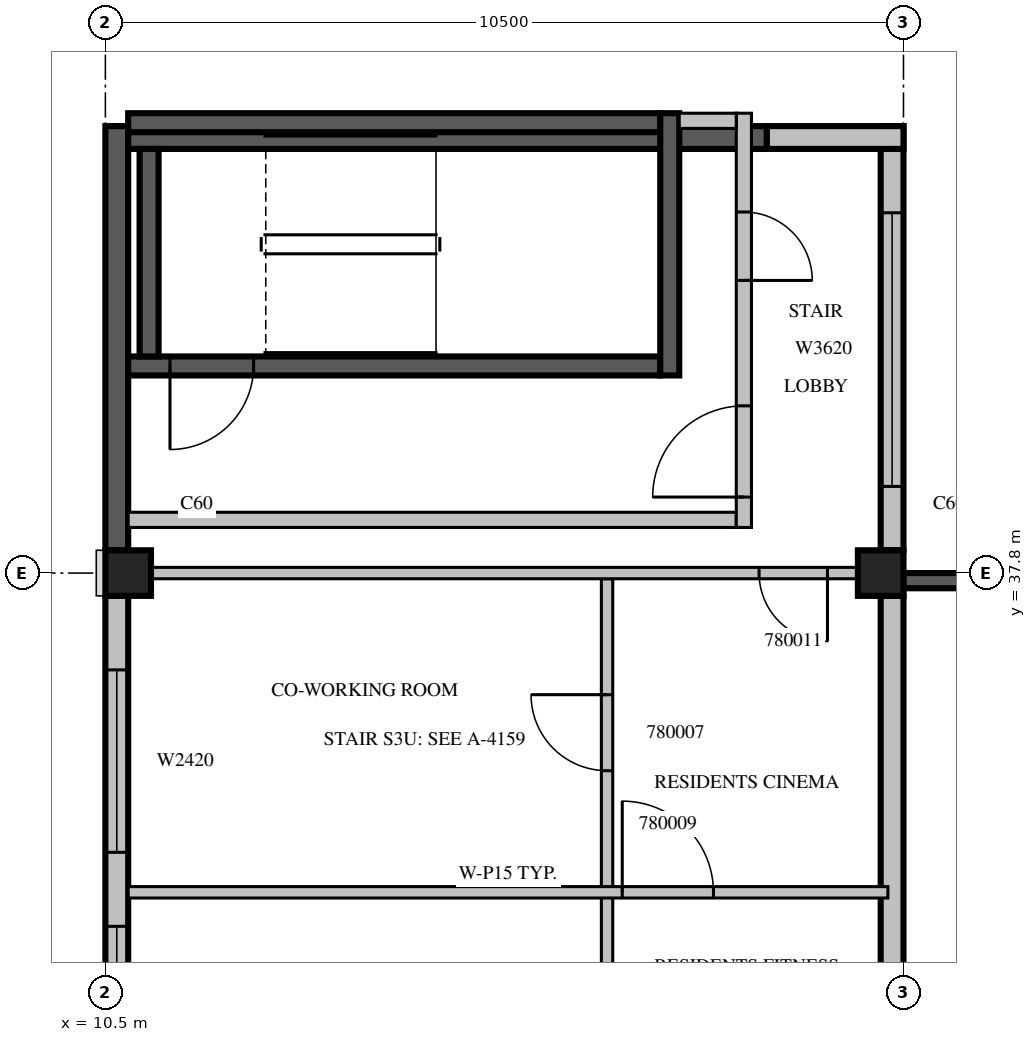
"""IFC4 building model, lengths in metres.
Left out: names, types, materials, properties, quantities, classifications, styles, units other than length and angle.
Written with IfcOpenShell. Run it as: python <this file> out.ifc"""

import sys

from ifc_helpers import new_model, si_unit, direction, frame, frame_2d, origin, origin_2d, place, context, subcontext, project, spatial, rectangle, extrude, source, transform, mapped, element, fill, save


model = new_model("IFC4")
c1 = context("Model", 3, precision=1e-05, world=origin(), true_north=direction((0.0, 1.0)))
c2 = subcontext(c1, "Body", "Model", "MODEL_VIEW")
j1 = project(units=[si_unit("LENGTHUNIT", "METRE"), si_unit("PLANEANGLEUNIT", "RADIAN")], contexts=[c1])
p1 = place(None, origin())
s1 = spatial("IfcSite", under=j1, at=p1, CompositionType="ELEMENT")
p2 = place(p1, origin())
s2 = spatial("IfcBuilding", under=s1, at=p2, CompositionType="ELEMENT")
p3 = place(p2, frame((0.0, 0.0, 340.5)))
s3 = spatial("IfcBuildingStorey", under=s2, at=p3, CompositionType="ELEMENT", Elevation=340.5)
m1 = source(origin(), c2, "Body", "SweptSolid", [
    extrude(rectangle(XDim=0.6, YDim=0.6, at=origin_2d()), origin(), (0.0, 0.0, 1.0), 3.5),
])
for number, where, z_axis, x_axis in (
    (1, (10.8, 37.8, 0.0), (0.0, 0.0, 1.0), (1.0, 0.0, 0.0)),
    (2, (20.7, 37.8, 0.0), (0.0, 0.0, 1.0), (1.0, 0.0, 0.0)),
):
    element("IfcColumn", number, at=place(p3, frame(where, z_axis=z_axis, x_axis=x_axis)), inside=s3, PredefinedType="COLUMN", context=c2, shape_type="MappedRepresentation", body=[
        mapped(m1, transform((0.0, 0.0, 0.0), scale=1.0)),
    ])
m2 = source(origin(), c2, "Body", "SweptSolid", [
    extrude(rectangle(XDim=7.8, YDim=0.3, at=frame_2d((3.9, 0.0))), origin(), (0.0, 0.0, 1.0), 3.1),
])
p4 = place(p3, frame((20.85, 29.7, 0.0), z_axis=(0.0, 0.0, 1.0), x_axis=(0.0, 1.0, 0.0)))
e3 = element("IfcWall", 3, at=p4, inside=s3, PredefinedType="STANDARD", context=c2, shape_type="MappedRepresentation", body=[
    mapped(m2, transform((0.0, 0.0, 0.0), scale=1.0)),
])
m3 = source(origin(), c2, "Body", "SweptSolid", [
    extrude(rectangle(XDim=1.0, YDim=2.1, at=frame_2d((0.5, 1.05))), frame((0.0, 0.16, 0.0), z_axis=(0.0, -1.0, 0.0), x_axis=(1.0, 0.0, 0.0)), (0.0, 0.0, 1.0), 0.32),
])
p5 = place(p4, frame((1.767, 0.0, 0.0)))
e4 = element("IfcOpeningElement", 4, at=p5, cuts=e3, PredefinedType="OPENING", context=c2, shape_type="MappedRepresentation", body=[
    mapped(m3, transform((0.0, 0.0, 0.0), scale=1.0)),
])
m4 = source(origin(), c2, "Body", "SweptSolid", [
    extrude(rectangle(XDim=5.58, YDim=0.3, at=frame_2d((2.79, 0.0))), origin(), (0.0, 0.0, 1.0), 3.1),
])
p6 = place(p3, frame((20.85, 38.1, 0.0), z_axis=(0.0, 0.0, 1.0), x_axis=(0.0, 1.0, 0.0)))
e5 = element("IfcWall", 5, at=p6, inside=s3, PredefinedType="STANDARD", context=c2, shape_type="MappedRepresentation", body=[
    mapped(m4, transform((0.0, 0.0, 0.0), scale=1.0)),
])
m5 = source(origin(), c2, "Body", "SweptSolid", [
    extrude(rectangle(XDim=3.6, YDim=2.0, at=frame_2d((1.8, 1.0))), frame((0.0, 0.16, 0.0), z_axis=(0.0, -1.0, 0.0), x_axis=(1.0, 0.0, 0.0)), (0.0, 0.0, 1.0), 0.32),
])
p7 = place(p6, frame((0.84, 0.0, 0.6)))
e6 = element("IfcOpeningElement", 6, at=p7, cuts=e5, PredefinedType="OPENING", context=c2, shape_type="MappedRepresentation", body=[
    mapped(m5, transform((0.0, 0.0, 0.0), scale=1.0)),
])
m6 = source(origin(), c2, "Body", "SweptSolid", [
    extrude(rectangle(XDim=1.8, YDim=0.3, at=frame_2d((0.9, 0.0))), origin(), (0.0, 0.0, 1.0), 3.1),
])
p8 = place(p3, frame((21.0, 43.53, 0.0), z_axis=(0.0, 0.0, 1.0), x_axis=(-1.0, 0.0, 0.0)))
e7 = element("IfcWall", 7, at=p8, inside=s3, PredefinedType="STANDARD", context=c2, shape_type="MappedRepresentation", body=[
    mapped(m6, transform((0.0, 0.0, 0.0), scale=1.0)),
])
m7 = source(origin(), c2, "Body", "SweptSolid", [
    extrude(rectangle(XDim=8.6, YDim=0.3, at=frame_2d((4.3, 0.0))), origin(), (0.0, 0.0, 1.0), 3.1),
])
p9 = place(p3, frame((19.2, 43.53, 0.0), z_axis=(0.0, 0.0, 1.0), x_axis=(-1.0, 0.0, 0.0)))
e8 = element("IfcWall", 8, at=p9, inside=s3, PredefinedType="SOLIDWALL", context=c2, shape_type="MappedRepresentation", body=[
    mapped(m7, transform((0.0, 0.0, 0.0), scale=1.0)),
])
m8 = source(origin(), c2, "Body", "SweptSolid", [
    extrude(rectangle(XDim=5.58, YDim=0.3, at=frame_2d((2.79, 0.0))), origin(), (0.0, 0.0, 1.0), 3.1),
])
p10 = place(p3, frame((10.65, 43.68, 0.0), z_axis=(0.0, 0.0, 1.0), x_axis=(0.0, -1.0, 0.0)))
e9 = element("IfcWall", 9, at=p10, inside=s3, PredefinedType="SOLIDWALL", context=c2, shape_type="MappedRepresentation", body=[
    mapped(m8, transform((0.0, 0.0, 0.0), scale=1.0)),
])
p11 = place(p3, frame((10.65, 37.5, 0.0), z_axis=(0.0, 0.0, 1.0), x_axis=(0.0, -1.0, 0.0)))
e10 = element("IfcWall", 10, at=p11, inside=s3, PredefinedType="STANDARD", context=c2, shape_type="SweptSolid", body=[
    extrude(rectangle(XDim=6.42, YDim=0.3, at=frame_2d((3.21, 0.0))), origin(), (0.0, 0.0, 1.0), 3.1),
])
m9 = source(origin(), c2, "Body", "SweptSolid", [
    extrude(rectangle(XDim=1.2, YDim=2.0, at=frame_2d((0.6, 1.0))), frame((0.0, 0.16, 0.0), z_axis=(0.0, -1.0, 0.0), x_axis=(1.0, 0.0, 0.0)), (0.0, 0.0, 1.0), 0.32),
])
p12 = place(p11, frame((4.348, 0.0, 0.6)))
e11 = element("IfcOpeningElement", 11, at=p12, cuts=e10, PredefinedType="OPENING", context=c2, shape_type="MappedRepresentation", body=[
    mapped(m9, transform((0.0, 0.0, 0.0), scale=1.0)),
])
m10 = source(origin(), c2, "Body", "SweptSolid", [
    extrude(rectangle(XDim=2.4, YDim=2.0, at=frame_2d((1.2, 1.0))), frame((0.0, 0.16, 0.0), z_axis=(0.0, -1.0, 0.0), x_axis=(1.0, 0.0, 0.0)), (0.0, 0.0, 1.0), 0.32),
])
p13 = place(p11, frame((0.974, 0.0, 0.6)))
e12 = element("IfcOpeningElement", 12, at=p13, cuts=e10, PredefinedType="OPENING", context=c2, shape_type="MappedRepresentation", body=[
    mapped(m10, transform((0.0, 0.0, 0.0), scale=1.0)),
])
m11 = source(origin(), c2, "Body", "SweptSolid", [
    extrude(rectangle(XDim=3.9, YDim=0.2, at=frame_2d((1.95, 0.0))), origin(), (0.0, 0.0, 1.0), 3.09),
])
p14 = place(p3, frame((21.0, 37.7, 0.0), z_axis=(0.0, 0.0, 1.0), x_axis=(1.0, 0.0, 0.0)))
e13 = element("IfcWall", 13, at=p14, inside=s3, PredefinedType="SOLIDWALL", context=c2, shape_type="MappedRepresentation", body=[
    mapped(m11, transform((0.0, 0.0, 0.0), scale=1.0)),
])
m12 = source(origin(), c2, "Body", "SweptSolid", [
    extrude(rectangle(XDim=2.4, YDim=2.0, at=frame_2d((1.2, 1.0))), frame((0.0, 0.11, 0.0), z_axis=(0.0, -1.0, 0.0), x_axis=(1.0, 0.0, 0.0)), (0.0, 0.0, 1.0), 0.22),
])
p15 = place(p14, frame((0.75, 0.0, 0.6)))
e14 = element("IfcOpeningElement", 14, at=p15, cuts=e13, PredefinedType="OPENING", context=c2, shape_type="MappedRepresentation", body=[
    mapped(m12, transform((0.0, 0.0, 0.0), scale=1.0)),
])
m13 = source(origin(), c2, "Body", "SweptSolid", [
    extrude(rectangle(XDim=7.0, YDim=0.25, at=frame_2d((3.5, 0.0))), origin(), (0.0, 0.0, 1.0), 3.1),
])
p16 = place(p3, frame((10.8, 40.525, 0.0), z_axis=(0.0, 0.0, 1.0), x_axis=(1.0, 0.0, 0.0)))
e15 = element("IfcWall", 15, at=p16, inside=s3, PredefinedType="SOLIDWALL", context=c2, shape_type="MappedRepresentation", body=[
    mapped(m13, transform((0.0, 0.0, 0.0), scale=1.0)),
])
m14 = source(origin(), c2, "Body", "SweptSolid", [
    extrude(rectangle(XDim=1.1, YDim=2.1, at=frame_2d((0.55, 1.05))), frame((0.0, 0.135, 0.0), z_axis=(0.0, -1.0, 0.0), x_axis=(1.0, 0.0, 0.0)), (0.0, 0.0, 1.0), 0.27),
])
p17 = place(p16, frame((0.55, 0.0, 0.0)))
e16 = element("IfcOpeningElement", 16, at=p17, cuts=e15, PredefinedType="OPENING", context=c2, shape_type="MappedRepresentation", body=[
    mapped(m14, transform((0.0, 0.0, 0.0), scale=1.0)),
])
p18 = place(p3, frame((10.8, 43.725, 0.0), z_axis=(0.0, 0.0, 1.0), x_axis=(1.0, 0.0, 0.0)))
e17 = element("IfcWall", 17, at=p18, inside=s3, PredefinedType="SOLIDWALL", context=c2, shape_type="MappedRepresentation", body=[
    mapped(m13, transform((0.0, 0.0, 0.0), scale=1.0)),
])
m15 = source(origin(), c2, "Body", "SweptSolid", [
    extrude(rectangle(XDim=3.45, YDim=0.25, at=frame_2d((1.725, 0.0))), origin(), (0.0, 0.0, 1.0), 3.1),
])
p19 = place(p3, frame((17.925, 40.4, 0.0), z_axis=(0.0, 0.0, 1.0), x_axis=(0.0, 1.0, 0.0)))
e18 = element("IfcWall", 18, at=p19, inside=s3, PredefinedType="SOLIDWALL", context=c2, shape_type="MappedRepresentation", body=[
    mapped(m15, transform((0.0, 0.0, 0.0), scale=1.0)),
])
m16 = source(origin(), c2, "Body", "SweptSolid", [
    extrude(rectangle(XDim=2.73, YDim=0.25, at=frame_2d((1.365, 0.0))), origin(), (0.0, 0.0, 1.0), 3.1),
])
p20 = place(p3, frame((11.075, 40.65, 0.0), z_axis=(0.0, 0.0, 1.0), x_axis=(0.0, 1.0, 0.0)))
e19 = element("IfcWall", 19, at=p20, inside=s3, PredefinedType="SOLIDWALL", context=c2, shape_type="MappedRepresentation", body=[
    mapped(m16, transform((0.0, 0.0, 0.0), scale=1.0)),
])
m17 = source(origin(), c2, "Body", "SweptSolid", [
    extrude(rectangle(XDim=8.0, YDim=0.2, at=frame_2d((4.0, 0.0))), origin(), (0.0, 0.0, 1.0), 3.1),
])
p21 = place(p3, frame((10.8, 38.5, 0.0), z_axis=(0.0, 0.0, 1.0), x_axis=(1.0, 0.0, 0.0)))
e20 = element("IfcWall", 20, at=p21, inside=s3, PredefinedType="PARTITIONING", context=c2, shape_type="MappedRepresentation", body=[
    mapped(m17, transform((0.0, 0.0, 0.0), scale=1.0)),
])
m18 = source(origin(), c2, "Body", "SweptSolid", [
    extrude(rectangle(XDim=5.45, YDim=0.2, at=frame_2d((2.725, 0.0))), origin(), (0.0, 0.0, 1.0), 3.1),
])
p22 = place(p3, frame((18.9, 38.4, 0.0), z_axis=(0.0, 0.0, 1.0), x_axis=(0.0, 1.0, 0.0)))
e21 = element("IfcWall", 21, at=p22, inside=s3, PredefinedType="PARTITIONING", context=c2, shape_type="MappedRepresentation", body=[
    mapped(m18, transform((0.0, 0.0, 0.0), scale=1.0)),
])
m19 = source(origin(), c2, "Body", "SweptSolid", [
    extrude(rectangle(XDim=1.2, YDim=2.1, at=frame_2d((0.6, 1.05))), frame((0.0, 0.11, 0.0), z_axis=(0.0, -1.0, 0.0), x_axis=(1.0, 0.0, 0.0)), (0.0, 0.0, 1.0), 0.22),
])
p23 = place(p22, frame((0.4, 0.0, 0.0)))
e22 = element("IfcOpeningElement", 22, at=p23, cuts=e21, PredefinedType="OPENING", context=c2, shape_type="MappedRepresentation", body=[
    mapped(m19, transform((0.0, 0.0, 0.0), scale=1.0)),
])
m20 = source(origin(), c2, "Body", "SweptSolid", [
    extrude(rectangle(XDim=0.9, YDim=2.1, at=frame_2d((0.45, 1.05))), frame((0.0, 0.11, 0.0), z_axis=(0.0, -1.0, 0.0), x_axis=(1.0, 0.0, 0.0)), (0.0, 0.0, 1.0), 0.22),
])
p24 = place(p22, frame((3.25, 0.0, 0.0)))
e23 = element("IfcOpeningElement", 23, at=p24, cuts=e21, PredefinedType="OPENING", context=c2, shape_type="MappedRepresentation", body=[
    mapped(m20, transform((0.0, 0.0, 0.0), scale=1.0)),
])
m21 = source(origin(), c2, "Body", "SweptSolid", [
    extrude(rectangle(XDim=0.75, YDim=0.2, at=frame_2d((0.375, 0.0))), origin(), (0.0, 0.0, 1.0), 3.1),
])
p25 = place(p3, frame((18.05, 43.75, 0.0), z_axis=(0.0, 0.0, 1.0), x_axis=(1.0, 0.0, 0.0)))
e24 = element("IfcWall", 24, at=p25, inside=s3, PredefinedType="PARTITIONING", context=c2, shape_type="MappedRepresentation", body=[
    mapped(m21, transform((0.0, 0.0, 0.0), scale=1.0)),
])
m22 = source(origin(), c2, "Body", "SweptSolid", [
    extrude(rectangle(XDim=4.2, YDim=0.15, at=frame_2d((2.1, 0.0))), origin(), (0.0, 0.0, 1.0), 3.1),
])
p26 = place(p3, frame((17.1, 33.6, 0.0), z_axis=(0.0, 0.0, 1.0), x_axis=(0.0, -1.0, 0.0)))
e25 = element("IfcWall", 25, at=p26, inside=s3, PredefinedType="PARTITIONING", context=c2, shape_type="MappedRepresentation", body=[
    mapped(m22, transform((0.0, 0.0, 0.0), scale=1.0)),
])
m23 = source(origin(), c2, "Body", "SweptSolid", [
    extrude(rectangle(XDim=1.0, YDim=2.1, at=frame_2d((0.5, 1.05))), frame((0.0, 0.085, 0.0), z_axis=(0.0, -1.0, 0.0), x_axis=(1.0, 0.0, 0.0)), (0.0, 0.0, 1.0), 0.17),
])
p27 = place(p26, frame((1.6, 0.0, 0.0)))
e26 = element("IfcOpeningElement", 26, at=p27, cuts=e25, PredefinedType="OPENING", context=c2, shape_type="MappedRepresentation", body=[
    mapped(m23, transform((0.0, 0.0, 0.0), scale=1.0)),
])
m24 = source(origin(), c2, "Body", "SweptSolid", [
    extrude(rectangle(XDim=4.105, YDim=0.15, at=frame_2d((2.053, 0.0))), origin(), (0.0, 0.0, 1.0), 3.1),
])
p28 = place(p3, frame((17.1, 37.725, 0.0), z_axis=(0.0, 0.0, 1.0), x_axis=(0.0, -1.0, 0.0)))
e27 = element("IfcWall", 27, at=p28, inside=s3, PredefinedType="PARTITIONING", context=c2, shape_type="MappedRepresentation", body=[
    mapped(m24, transform((0.0, 0.0, 0.0), scale=1.0)),
])
p29 = place(p28, frame((1.525, 0.0, 0.0)))
e28 = element("IfcOpeningElement", 28, at=p29, cuts=e27, PredefinedType="OPENING", context=c2, shape_type="MappedRepresentation", body=[
    mapped(m23, transform((0.0, 0.0, 0.0), scale=1.0)),
])
m25 = source(origin(), c2, "Body", "SweptSolid", [
    extrude(rectangle(XDim=9.995, YDim=0.15, at=frame_2d((4.997, 0.0))), origin(), (0.0, 0.0, 1.0), 3.1),
])
p30 = place(p3, frame((10.8, 33.6, 0.0), z_axis=(0.0, 0.0, 1.0), x_axis=(1.0, 0.0, 0.0)))
e29 = element("IfcWall", 29, at=p30, inside=s3, PredefinedType="PARTITIONING", context=c2, shape_type="MappedRepresentation", body=[
    mapped(m25, transform((0.0, 0.0, 0.0), scale=1.0)),
])
m26 = source(origin(), c2, "Body", "SweptSolid", [
    extrude(rectangle(XDim=1.2, YDim=2.1, at=frame_2d((0.6, 1.05))), frame((0.0, 0.085, 0.0), z_axis=(0.0, -1.0, 0.0), x_axis=(1.0, 0.0, 0.0)), (0.0, 0.0, 1.0), 0.17),
])
p31 = place(p30, frame((6.5, 0.0, 0.0)))
e30 = element("IfcOpeningElement", 30, at=p31, cuts=e29, PredefinedType="OPENING", context=c2, shape_type="MappedRepresentation", body=[
    mapped(m26, transform((0.0, 0.0, 0.0), scale=1.0)),
])
m27 = source(origin(), c2, "Body", "SweptSolid", [
    extrude(rectangle(XDim=9.302, YDim=0.15, at=frame_2d((4.651, 0.0))), origin(), (0.0, 0.0, 1.0), 3.1),
])
p32 = place(p3, frame((20.401, 37.8, 0.0), z_axis=(0.0, 0.0, 1.0), x_axis=(-1.0, 0.0, 0.0)))
e31 = element("IfcWall", 31, at=p32, inside=s3, PredefinedType="PARTITIONING", context=c2, shape_type="MappedRepresentation", body=[
    mapped(m27, transform((0.0, 0.0, 0.0), scale=1.0)),
])
m28 = source(origin(), c2, "Body", "SweptSolid", [
    extrude(rectangle(XDim=0.9, YDim=2.1, at=frame_2d((0.45, 1.05))), frame((0.0, 0.085, 0.0), z_axis=(0.0, -1.0, 0.0), x_axis=(1.0, 0.0, 0.0)), (0.0, 0.0, 1.0), 0.17),
])
p33 = place(p32, frame((0.401, 0.0, 0.0)))
e32 = element("IfcOpeningElement", 32, at=p33, cuts=e31, PredefinedType="OPENING", context=c2, shape_type="MappedRepresentation", body=[
    mapped(m28, transform((0.0, 0.0, 0.0), scale=1.0)),
])
m29 = source(origin(), c2, "Body", "SweptSolid", [
    extrude(rectangle(XDim=3.6, YDim=2.0, at=frame_2d((1.8, 1.0))), frame((0.0, 0.03, 0.0), z_axis=(0.0, -1.0, 0.0), x_axis=(1.0, 0.0, 0.0)), (0.0, 0.0, 1.0), 0.06),
])
p34 = place(p7, origin())
e33 = element("IfcWindow", 33, at=p34, inside=s3, PartitioningType="SINGLE_PANEL", PredefinedType="WINDOW", context=c2, shape_type="MappedRepresentation", body=[
    mapped(m29, transform((0.0, 0.0, 0.0), scale=1.0)),
])
fill(e6, e33)
m30 = source(origin(), c2, "Body", "SweptSolid", [
    extrude(rectangle(XDim=1.2, YDim=2.0, at=frame_2d((0.6, 1.0))), frame((0.0, 0.03, 0.0), z_axis=(0.0, -1.0, 0.0), x_axis=(1.0, 0.0, 0.0)), (0.0, 0.0, 1.0), 0.06),
])
p35 = place(p12, origin())
e34 = element("IfcWindow", 34, at=p35, inside=s3, PartitioningType="SINGLE_PANEL", PredefinedType="WINDOW", context=c2, shape_type="MappedRepresentation", body=[
    mapped(m30, transform((0.0, 0.0, 0.0), scale=1.0)),
])
fill(e11, e34)
m31 = source(origin(), c2, "Body", "SweptSolid", [
    extrude(rectangle(XDim=2.4, YDim=2.0, at=frame_2d((1.2, 1.0))), frame((0.0, 0.03, 0.0), z_axis=(0.0, -1.0, 0.0), x_axis=(1.0, 0.0, 0.0)), (0.0, 0.0, 1.0), 0.06),
])
p36 = place(p13, origin())
e35 = element("IfcWindow", 35, at=p36, inside=s3, PartitioningType="SINGLE_PANEL", PredefinedType="WINDOW", context=c2, shape_type="MappedRepresentation", body=[
    mapped(m31, transform((0.0, 0.0, 0.0), scale=1.0)),
])
fill(e12, e35)
m32 = source(origin(), c2, "Body", "SweptSolid", [
    extrude(rectangle(XDim=1.1, YDim=2.1, at=frame_2d((0.55, 1.05))), frame((0.0, 0.025, 0.0), z_axis=(0.0, -1.0, 0.0), x_axis=(1.0, 0.0, 0.0)), (0.0, 0.0, 1.0), 0.05),
])
p37 = place(p17, origin())
e36 = element("IfcDoor", 36, at=p37, inside=s3, OperationType="SINGLE_SWING_RIGHT", PredefinedType="DOOR", context=c2, shape_type="MappedRepresentation", body=[
    mapped(m32, transform((0.0, 0.0, 0.0), scale=1.0)),
])
fill(e16, e36)
m33 = source(origin(), c2, "Body", "SweptSolid", [
    extrude(rectangle(XDim=1.2, YDim=2.1, at=frame_2d((0.6, 1.05))), frame((0.0, 0.025, 0.0), z_axis=(0.0, -1.0, 0.0), x_axis=(1.0, 0.0, 0.0)), (0.0, 0.0, 1.0), 0.05),
])
p38 = place(p23, origin())
e37 = element("IfcDoor", 37, at=p38, inside=s3, OperationType="SINGLE_SWING_LEFT", PredefinedType="DOOR", context=c2, shape_type="MappedRepresentation", body=[
    mapped(m33, transform((0.0, 0.0, 0.0), scale=1.0)),
])
fill(e22, e37)
m34 = source(origin(), c2, "Body", "SweptSolid", [
    extrude(rectangle(XDim=0.9, YDim=2.1, at=frame_2d((0.45, 1.05))), frame((0.0, 0.025, 0.0), z_axis=(0.0, -1.0, 0.0), x_axis=(1.0, 0.0, 0.0)), (0.0, 0.0, 1.0), 0.05),
])
p39 = place(p24, origin())
e38 = element("IfcDoor", 38, at=p39, inside=s3, OperationType="SINGLE_SWING_RIGHT", PredefinedType="DOOR", context=c2, shape_type="MappedRepresentation", body=[
    mapped(m34, transform((0.0, 0.0, 0.0), scale=1.0)),
])
fill(e23, e38)
m35 = source(origin(), c2, "Body", "SweptSolid", [
    extrude(rectangle(XDim=1.0, YDim=2.1, at=frame_2d((0.5, 1.05))), frame((0.0, 0.025, 0.0), z_axis=(0.0, -1.0, 0.0), x_axis=(1.0, 0.0, 0.0)), (0.0, 0.0, 1.0), 0.05),
])
p40 = place(p29, origin())
e39 = element("IfcDoor", 39, at=p40, inside=s3, OperationType="SINGLE_SWING_RIGHT", PredefinedType="DOOR", context=c2, shape_type="MappedRepresentation", body=[
    mapped(m35, transform((0.0, 0.0, 0.0), scale=1.0)),
])
fill(e28, e39)
p41 = place(p31, origin())
e40 = element("IfcDoor", 40, at=p41, inside=s3, OperationType="SINGLE_SWING_LEFT", PredefinedType="DOOR", context=c2, shape_type="MappedRepresentation", body=[
    mapped(m33, transform((0.0, 0.0, 0.0), scale=1.0)),
])
fill(e30, e40)
p42 = place(p33, origin())
e41 = element("IfcDoor", 41, at=p42, inside=s3, OperationType="SINGLE_SWING_LEFT", PredefinedType="DOOR", context=c2, shape_type="MappedRepresentation", body=[
    mapped(m34, transform((0.0, 0.0, 0.0), scale=1.0)),
])
fill(e32, e41)
save(model, sys.argv[1])
